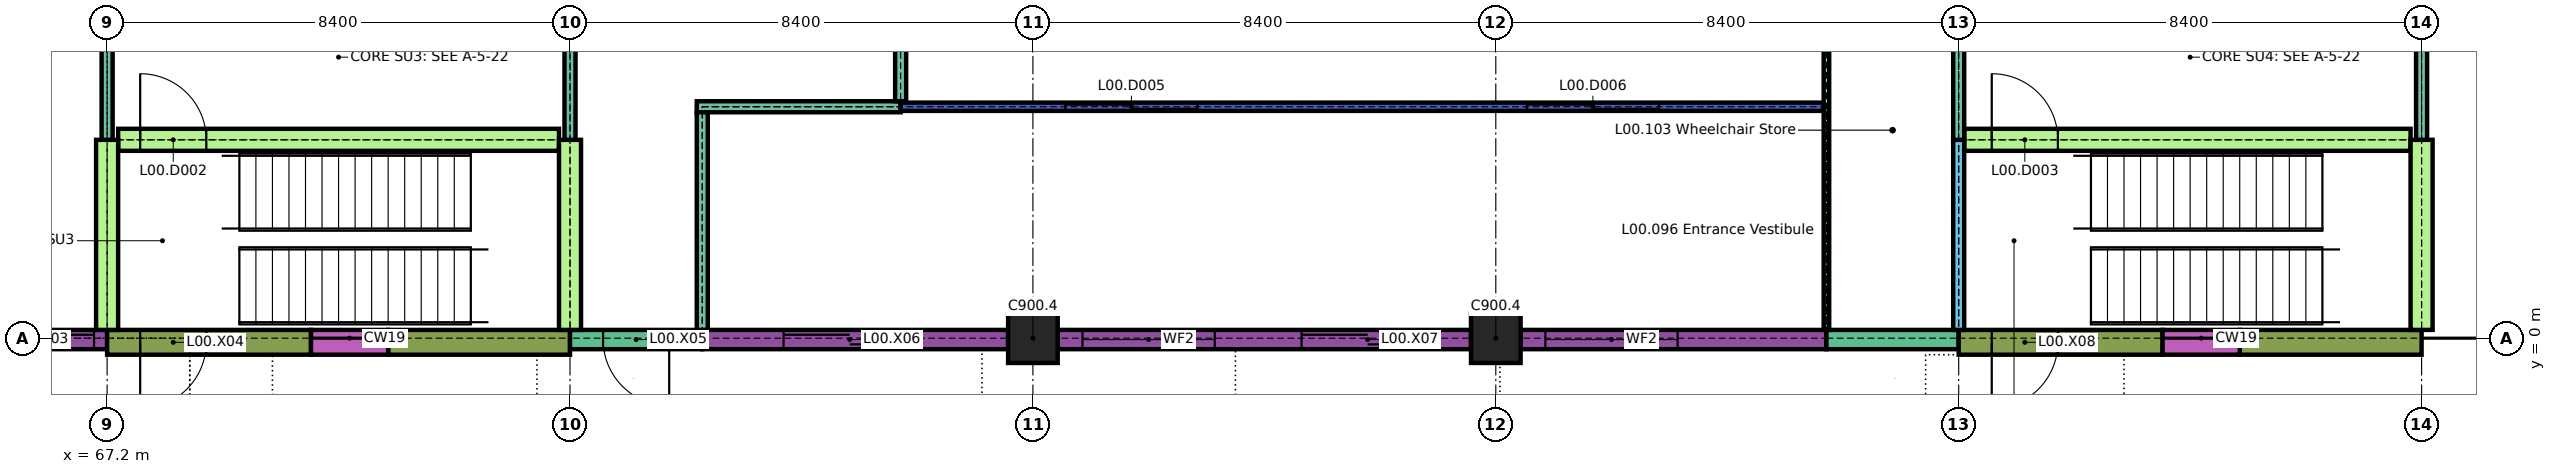
"""IFC4 building model, lengths in metres.
Left out: names, types, materials, properties, quantities, classifications, styles, units other than length and angle.
Written with IfcOpenShell. Run it as: python <this file> out.ifc"""

import sys

from ifc_helpers import new_model, si_unit, direction, frame, frame_2d, origin, origin_2d, place, context, subcontext, project, spatial, rectangle, extrude, element, fill, save


model = new_model("IFC4")
c1 = context("Model", 3, precision=1e-05, world=origin(), true_north=direction((0.0, 1.0)))
c2 = subcontext(c1, "Body", "Model", "MODEL_VIEW")
j1 = project(units=[si_unit("LENGTHUNIT", "METRE"), si_unit("PLANEANGLEUNIT", "RADIAN")], contexts=[c1])
p1 = place(None, origin())
s1 = spatial("IfcSite", under=j1, at=p1, CompositionType="ELEMENT")
p2 = place(p1, origin())
s2 = spatial("IfcBuilding", under=s1, at=p2, CompositionType="ELEMENT")
p3 = place(p2, origin())
s3 = spatial("IfcBuildingStorey", under=s2, at=p3, CompositionType="ELEMENT", Elevation=0.0)
for number, where, z_axis, x_axis in (
    (1, (84.0, 0.0, 0.0), (0.0, 0.0, 1.0), (1.0, 0.0, 0.0)),
    (2, (92.4, 0.0, 0.0), (0.0, 0.0, 1.0), (1.0, 0.0, 0.0)),
):
    element("IfcColumn", number, at=place(p3, frame(where, z_axis=z_axis, x_axis=x_axis)), inside=s3, PredefinedType="COLUMN", context=c2, shape_type="SweptSolid", body=[
        extrude(rectangle(XDim=0.9, YDim=0.9, at=origin_2d()), origin(), (0.0, 0.0, 1.0), 4.14),
    ])
p4 = place(p3, frame((59.25, -0.025, 0.0), z_axis=(0.0, 0.0, 1.0), x_axis=(1.0, 0.0, 0.0)))
e3 = element("IfcWall", 3, at=p4, inside=s3, PredefinedType="SOLIDWALL", context=c2, shape_type="SweptSolid", body=[
    extrude(rectangle(XDim=7.95, YDim=0.35, at=frame_2d((3.975, 0.0))), origin(), (0.0, 0.0, 1.0), 3.84),
])
p5 = place(p4, frame((4.212, 0.0, 0.0)))
e4 = element("IfcOpeningElement", 4, at=p5, cuts=e3, PredefinedType="OPENING", context=c2, shape_type="SweptSolid", body=[
    extrude(rectangle(XDim=3.5, YDim=3.0, at=frame_2d((1.75, 1.5))), frame((0.0, 0.185, 0.0), z_axis=(0.0, -1.0, 0.0), x_axis=(1.0, 0.0, 0.0)), (0.0, 0.0, 1.0), 0.37),
])
p6 = place(p3, frame((67.2, -0.075, 0.0), z_axis=(0.0, 0.0, 1.0), x_axis=(1.0, 0.0, 0.0)))
e5 = element("IfcWall", 5, at=p6, inside=s3, PredefinedType="SOLIDWALL", context=c2, shape_type="SweptSolid", body=[
    extrude(rectangle(XDim=3.7, YDim=0.45, at=frame_2d((1.85, 0.0))), origin(), (0.0, 0.0, 1.0), 4.14),
])
p7 = place(p6, frame((0.6, 0.0, 0.0)))
e6 = element("IfcOpeningElement", 6, at=p7, cuts=e5, PredefinedType="OPENING", context=c2, shape_type="SweptSolid", body=[
    extrude(rectangle(XDim=1.2, YDim=2.1, at=frame_2d((0.6, 1.05))), frame((0.0, 0.235, 0.0), z_axis=(0.0, -1.0, 0.0), x_axis=(1.0, 0.0, 0.0)), (0.0, 0.0, 1.0), 0.47),
])
p8 = place(p3, frame((72.3, -0.075, 0.0), z_axis=(0.0, 0.0, 1.0), x_axis=(1.0, 0.0, 0.0)))
e7 = element("IfcWall", 7, at=p8, inside=s3, PredefinedType="SOLIDWALL", context=c2, shape_type="SweptSolid", body=[
    extrude(rectangle(XDim=3.3, YDim=0.45, at=frame_2d((1.65, 0.0))), origin(), (0.0, 0.0, 1.0), 4.14),
])
p9 = place(p3, frame((70.9, -0.075, 0.0), z_axis=(0.0, 0.0, 1.0), x_axis=(1.0, 0.0, 0.0)))
e8 = element("IfcWall", 8, at=p9, inside=s3, PredefinedType="SOLIDWALL", context=c2, shape_type="SweptSolid", body=[
    extrude(rectangle(XDim=1.4, YDim=0.45, at=frame_2d((0.7, 0.0))), origin(), (0.0, 0.0, 1.0), 0.6),
])
p10 = place(p3, frame((75.6, -0.025, 0.0), z_axis=(0.0, 0.0, 1.0), x_axis=(1.0, 0.0, 0.0)))
e9 = element("IfcWall", 9, at=p10, inside=s3, PredefinedType="SOLIDWALL", context=c2, shape_type="SweptSolid", body=[
    extrude(rectangle(XDim=2.4, YDim=0.35, at=frame_2d((1.2, 0.0))), origin(), (0.0, 0.0, 1.0), 3.84),
])
p11 = place(p10, frame((0.6, 0.0, 0.0)))
e10 = element("IfcOpeningElement", 10, at=p11, cuts=e9, PredefinedType="OPENING", context=c2, shape_type="SweptSolid", body=[
    extrude(rectangle(XDim=1.2, YDim=2.1, at=frame_2d((0.6, 1.05))), frame((0.0, 0.185, 0.0), z_axis=(0.0, -1.0, 0.0), x_axis=(1.0, 0.0, 0.0)), (0.0, 0.0, 1.0), 0.37),
])
p12 = place(p3, frame((78.0, -0.025, 0.0), z_axis=(0.0, 0.0, 1.0), x_axis=(1.0, 0.0, 0.0)))
e11 = element("IfcWall", 11, at=p12, inside=s3, PredefinedType="SOLIDWALL", context=c2, shape_type="SweptSolid", body=[
    extrude(rectangle(XDim=5.55, YDim=0.35, at=frame_2d((2.775, 0.0))), origin(), (0.0, 0.0, 1.0), 3.84),
])
p13 = place(p12, frame((1.475, 0.0, 0.0)))
e12 = element("IfcOpeningElement", 12, at=p13, cuts=e11, PredefinedType="OPENING", context=c2, shape_type="SweptSolid", body=[
    extrude(rectangle(XDim=2.4, YDim=3.0, at=frame_2d((1.2, 1.5))), frame((0.0, 0.185, 0.0), z_axis=(0.0, -1.0, 0.0), x_axis=(1.0, 0.0, 0.0)), (0.0, 0.0, 1.0), 0.37),
])
p14 = place(p3, frame((84.45, -0.025, 0.0), z_axis=(0.0, 0.0, 1.0), x_axis=(1.0, 0.0, 0.0)))
e13 = element("IfcWall", 13, at=p14, inside=s3, PredefinedType="SOLIDWALL", context=c2, shape_type="SweptSolid", body=[
    extrude(rectangle(XDim=7.5, YDim=0.35, at=frame_2d((3.75, 0.0))), origin(), (0.0, 0.0, 1.0), 3.84),
])
p15 = place(p14, frame((0.45, 0.0, 0.9)))
e14 = element("IfcOpeningElement", 14, at=p15, cuts=e13, PredefinedType="OPENING", context=c2, shape_type="SweptSolid", body=[
    extrude(rectangle(XDim=2.4, YDim=2.1, at=frame_2d((1.2, 1.05))), frame((0.0, 0.185, 0.0), z_axis=(0.0, -1.0, 0.0), x_axis=(1.0, 0.0, 0.0)), (0.0, 0.0, 1.0), 0.37),
])
p16 = place(p14, frame((4.425, 0.0, 0.0)))
e15 = element("IfcOpeningElement", 15, at=p16, cuts=e13, PredefinedType="OPENING", context=c2, shape_type="SweptSolid", body=[
    extrude(rectangle(XDim=2.4, YDim=3.0, at=frame_2d((1.2, 1.5))), frame((0.0, 0.185, 0.0), z_axis=(0.0, -1.0, 0.0), x_axis=(1.0, 0.0, 0.0)), (0.0, 0.0, 1.0), 0.37),
])
p17 = place(p3, frame((92.85, -0.025, 0.0), z_axis=(0.0, 0.0, 1.0), x_axis=(1.0, 0.0, 0.0)))
e16 = element("IfcWall", 16, at=p17, inside=s3, PredefinedType="SOLIDWALL", context=c2, shape_type="SweptSolid", body=[
    extrude(rectangle(XDim=5.55, YDim=0.35, at=frame_2d((2.775, 0.0))), origin(), (0.0, 0.0, 1.0), 3.84),
])
p18 = place(p17, frame((0.45, 0.0, 0.9)))
e17 = element("IfcOpeningElement", 17, at=p18, cuts=e16, PredefinedType="OPENING", context=c2, shape_type="SweptSolid", body=[
    extrude(rectangle(XDim=2.4, YDim=2.1, at=frame_2d((1.2, 1.05))), frame((0.0, 0.185, 0.0), z_axis=(0.0, -1.0, 0.0), x_axis=(1.0, 0.0, 0.0)), (0.0, 0.0, 1.0), 0.37),
])
p19 = place(p3, frame((98.4, -0.025, 0.0), z_axis=(0.0, 0.0, 1.0), x_axis=(1.0, 0.0, 0.0)))
e18 = element("IfcWall", 18, at=p19, inside=s3, PredefinedType="SOLIDWALL", context=c2, shape_type="SweptSolid", body=[
    extrude(rectangle(XDim=2.4, YDim=0.35, at=frame_2d((1.2, 0.0))), origin(), (0.0, 0.0, 1.0), 3.84),
])
p20 = place(p3, frame((100.8, -0.075, 0.0), z_axis=(0.0, 0.0, 1.0), x_axis=(1.0, 0.0, 0.0)))
e19 = element("IfcWall", 19, at=p20, inside=s3, PredefinedType="SOLIDWALL", context=c2, shape_type="SweptSolid", body=[
    extrude(rectangle(XDim=3.7, YDim=0.45, at=frame_2d((1.85, 0.0))), origin(), (0.0, 0.0, 1.0), 4.14),
])
p21 = place(p20, frame((0.6, 0.0, 0.0)))
e20 = element("IfcOpeningElement", 20, at=p21, cuts=e19, PredefinedType="OPENING", context=c2, shape_type="SweptSolid", body=[
    extrude(rectangle(XDim=1.2, YDim=2.1, at=frame_2d((0.6, 1.05))), frame((0.0, 0.235, 0.0), z_axis=(0.0, -1.0, 0.0), x_axis=(1.0, 0.0, 0.0)), (0.0, 0.0, 1.0), 0.47),
])
p22 = place(p3, frame((105.9, -0.075, 0.0), z_axis=(0.0, 0.0, 1.0), x_axis=(1.0, 0.0, 0.0)))
e21 = element("IfcWall", 21, at=p22, inside=s3, PredefinedType="SOLIDWALL", context=c2, shape_type="SweptSolid", body=[
    extrude(rectangle(XDim=3.3, YDim=0.45, at=frame_2d((1.65, 0.0))), origin(), (0.0, 0.0, 1.0), 4.14),
])
p23 = place(p3, frame((104.5, -0.075, 0.0), z_axis=(0.0, 0.0, 1.0), x_axis=(1.0, 0.0, 0.0)))
e22 = element("IfcWall", 22, at=p23, inside=s3, PredefinedType="SOLIDWALL", context=c2, shape_type="SweptSolid", body=[
    extrude(rectangle(XDim=1.4, YDim=0.45, at=frame_2d((0.7, 0.0))), origin(), (0.0, 0.0, 1.0), 0.6),
])
p24 = place(p3, frame((67.4, 3.6, 0.0), z_axis=(0.0, 0.0, 1.0), x_axis=(1.0, 0.0, 0.0)))
e23 = element("IfcWall", 23, at=p24, inside=s3, PredefinedType="SHEAR", context=c2, shape_type="SweptSolid", body=[
    extrude(rectangle(XDim=8.0, YDim=0.4, at=frame_2d((4.0, 0.0))), origin(), (0.0, 0.0, 1.0), 4.14),
])
p25 = place(p24, frame((0.4, 0.0, 0.0)))
e24 = element("IfcOpeningElement", 24, at=p25, cuts=e23, PredefinedType="OPENING", context=c2, shape_type="SweptSolid", body=[
    extrude(rectangle(XDim=1.2, YDim=2.1, at=frame_2d((0.6, 1.05))), frame((0.0, 0.21, 0.0), z_axis=(0.0, -1.0, 0.0), x_axis=(1.0, 0.0, 0.0)), (0.0, 0.0, 1.0), 0.42),
])
p26 = place(p3, frame((100.9, 3.6, 0.0), z_axis=(0.0, 0.0, 1.0), x_axis=(1.0, 0.0, 0.0)))
e25 = element("IfcWall", 25, at=p26, inside=s3, PredefinedType="SHEAR", context=c2, shape_type="SweptSolid", body=[
    extrude(rectangle(XDim=8.1, YDim=0.4, at=frame_2d((4.05, 0.0))), origin(), (0.0, 0.0, 1.0), 4.14),
])
p27 = place(p26, frame((0.5, 0.0, 0.0)))
e26 = element("IfcOpeningElement", 26, at=p27, cuts=e25, PredefinedType="OPENING", context=c2, shape_type="SweptSolid", body=[
    extrude(rectangle(XDim=1.2, YDim=2.1, at=frame_2d((0.6, 1.05))), frame((0.0, 0.21, 0.0), z_axis=(0.0, -1.0, 0.0), x_axis=(1.0, 0.0, 0.0)), (0.0, 0.0, 1.0), 0.42),
])
p28 = place(p3, frame((77.9, 4.2, 0.0), z_axis=(0.0, 0.0, 1.0), x_axis=(1.0, 0.0, 0.0)))
e27 = element("IfcWall", 27, at=p28, inside=s3, PredefinedType="PARTITIONING", context=c2, shape_type="SweptSolid", body=[
    extrude(rectangle(XDim=3.7, YDim=0.2, at=frame_2d((1.85, 0.0))), origin(), (0.0, 0.0, 1.0), 4.14),
])
p29 = place(p3, frame((81.6, 4.2, 0.0), z_axis=(0.0, 0.0, 1.0), x_axis=(1.0, 0.0, 0.0)))
e28 = element("IfcWall", 28, at=p29, inside=s3, PredefinedType="PARTITIONING", context=c2, shape_type="SweptSolid", body=[
    extrude(rectangle(XDim=16.75, YDim=0.15, at=frame_2d((8.375, 0.0))), origin(), (0.0, 0.0, 1.0), 4.14),
])
p30 = place(p29, frame((2.988, 0.0, 0.0)))
e29 = element("IfcOpeningElement", 29, at=p30, cuts=e28, PredefinedType="OPENING", context=c2, shape_type="SweptSolid", body=[
    extrude(rectangle(XDim=2.4, YDim=2.4, at=frame_2d((1.2, 1.2))), frame((0.0, 0.085, 0.0), z_axis=(0.0, -1.0, 0.0), x_axis=(1.0, 0.0, 0.0)), (0.0, 0.0, 1.0), 0.17),
])
p31 = place(p29, frame((11.363, 0.0, 0.0)))
e30 = element("IfcOpeningElement", 30, at=p31, cuts=e28, PredefinedType="OPENING", context=c2, shape_type="SweptSolid", body=[
    extrude(rectangle(XDim=2.4, YDim=2.4, at=frame_2d((1.2, 1.2))), frame((0.0, 0.085, 0.0), z_axis=(0.0, -1.0, 0.0), x_axis=(1.0, 0.0, 0.0)), (0.0, 0.0, 1.0), 0.17),
])
p32 = place(p3, frame((67.2, 0.15, 0.0), z_axis=(0.0, 0.0, 1.0), x_axis=(0.0, 1.0, 0.0)))
e31 = element("IfcWall", 31, at=p32, inside=s3, PredefinedType="SHEAR", context=c2, shape_type="SweptSolid", body=[
    extrude(rectangle(XDim=3.45, YDim=0.4, at=frame_2d((1.725, 0.0))), origin(), (0.0, 0.0, 1.0), 4.14),
])
p33 = place(p3, frame((67.2, 3.6, 0.0), z_axis=(0.0, 0.0, 1.0), x_axis=(0.0, 1.0, 0.0)))
e32 = element("IfcWall", 32, at=p33, inside=s3, PredefinedType="PARTITIONING", context=c2, shape_type="SweptSolid", body=[
    extrude(rectangle(XDim=4.8, YDim=0.2, at=frame_2d((2.4, 0.0))), origin(), (0.0, 0.0, 1.0), 4.14),
])
p34 = place(p3, frame((75.6, 0.15, 0.0), z_axis=(0.0, 0.0, 1.0), x_axis=(0.0, 1.0, 0.0)))
e33 = element("IfcWall", 33, at=p34, inside=s3, PredefinedType="SHEAR", context=c2, shape_type="SweptSolid", body=[
    extrude(rectangle(XDim=3.45, YDim=0.4, at=frame_2d((1.725, 0.0))), origin(), (0.0, 0.0, 1.0), 4.14),
])
p35 = place(p3, frame((75.6, 3.6, 0.0), z_axis=(0.0, 0.0, 1.0), x_axis=(0.0, 1.0, 0.0)))
e34 = element("IfcWall", 34, at=p35, inside=s3, PredefinedType="PARTITIONING", context=c2, shape_type="SweptSolid", body=[
    extrude(rectangle(XDim=6.6, YDim=0.2, at=frame_2d((3.3, 0.0))), origin(), (0.0, 0.0, 1.0), 4.14),
])
p36 = place(p35, frame((1.8, 0.0, 0.0)))
e35 = element("IfcOpeningElement", 35, at=p36, cuts=e34, PredefinedType="OPENING", context=c2, shape_type="SweptSolid", body=[
    extrude(rectangle(XDim=1.2, YDim=2.1, at=frame_2d((0.6, 1.05))), frame((0.0, 0.11, 0.0), z_axis=(0.0, -1.0, 0.0), x_axis=(1.0, 0.0, 0.0)), (0.0, 0.0, 1.0), 0.22),
])
p37 = place(p3, frame((78.0, 0.15, 0.0), z_axis=(0.0, 0.0, 1.0), x_axis=(0.0, 1.0, 0.0)))
e36 = element("IfcWall", 36, at=p37, inside=s3, PredefinedType="PARTITIONING", context=c2, shape_type="SweptSolid", body=[
    extrude(rectangle(XDim=3.95, YDim=0.2, at=frame_2d((1.975, 0.0))), origin(), (0.0, 0.0, 1.0), 4.14),
])
p38 = place(p3, frame((81.6, 4.3, 0.0), z_axis=(0.0, 0.0, 1.0), x_axis=(0.0, 1.0, 0.0)))
e37 = element("IfcWall", 37, at=p38, inside=s3, PredefinedType="PARTITIONING", context=c2, shape_type="SweptSolid", body=[
    extrude(rectangle(XDim=5.9, YDim=0.2, at=frame_2d((2.95, 0.0))), origin(), (0.0, 0.0, 1.0), 4.14),
])
p39 = place(p38, frame((2.35, 0.0, 0.0)))
e38 = element("IfcOpeningElement", 38, at=p39, cuts=e37, PredefinedType="OPENING", context=c2, shape_type="SweptSolid", body=[
    extrude(rectangle(XDim=1.2, YDim=2.1, at=frame_2d((0.6, 1.05))), frame((0.0, 0.11, 0.0), z_axis=(0.0, -1.0, 0.0), x_axis=(1.0, 0.0, 0.0)), (0.0, 0.0, 1.0), 0.22),
])
p40 = place(p3, frame((98.4, 0.15, 0.0), z_axis=(0.0, 0.0, 1.0), x_axis=(0.0, 1.0, 0.0)))
e39 = element("IfcWall", 39, at=p40, inside=s3, PredefinedType="PARTITIONING", context=c2, shape_type="SweptSolid", body=[
    extrude(rectangle(XDim=8.2, YDim=0.1, at=frame_2d((4.1, 0.0))), origin(), (0.0, 0.0, 1.0), 4.14),
])
p41 = place(p3, frame((100.8, 0.15, 0.0), z_axis=(0.0, 0.0, 1.0), x_axis=(0.0, 1.0, 0.0)))
e40 = element("IfcWall", 40, at=p41, inside=s3, PredefinedType="PARTITIONING", context=c2, shape_type="SweptSolid", body=[
    extrude(rectangle(XDim=3.45, YDim=0.2, at=frame_2d((1.725, 0.0))), origin(), (0.0, 0.0, 1.0), 4.14),
])
p42 = place(p3, frame((100.8, 3.6, 0.0), z_axis=(0.0, 0.0, 1.0), x_axis=(0.0, 1.0, 0.0)))
e41 = element("IfcWall", 41, at=p42, inside=s3, PredefinedType="PARTITIONING", context=c2, shape_type="SweptSolid", body=[
    extrude(rectangle(XDim=4.7, YDim=0.2, at=frame_2d((2.35, 0.0))), origin(), (0.0, 0.0, 1.0), 4.14),
])
p43 = place(p3, frame((109.2, 0.15, 0.0), z_axis=(0.0, 0.0, 1.0), x_axis=(0.0, 1.0, 0.0)))
e42 = element("IfcWall", 42, at=p43, inside=s3, PredefinedType="SHEAR", context=c2, shape_type="SweptSolid", body=[
    extrude(rectangle(XDim=3.45, YDim=0.4, at=frame_2d((1.725, 0.0))), origin(), (0.0, 0.0, 1.0), 4.14),
])
p44 = place(p3, frame((109.2, 3.6, 0.0), z_axis=(0.0, 0.0, 1.0), x_axis=(0.0, 1.0, 0.0)))
e43 = element("IfcWall", 43, at=p44, inside=s3, PredefinedType="PARTITIONING", context=c2, shape_type="SweptSolid", body=[
    extrude(rectangle(XDim=4.7, YDim=0.2, at=frame_2d((2.35, 0.0))), origin(), (0.0, 0.0, 1.0), 4.14),
])
p45 = place(p44, frame((1.65, 0.0, 0.9)))
e44 = element("IfcOpeningElement", 44, at=p45, cuts=e43, PredefinedType="OPENING", context=c2, shape_type="SweptSolid", body=[
    extrude(rectangle(XDim=1.5, YDim=1.0, at=frame_2d((0.75, 0.5))), frame((0.0, 0.11, 0.0), z_axis=(0.0, -1.0, 0.0), x_axis=(1.0, 0.0, 0.0)), (0.0, 0.0, 1.0), 0.22),
])
p46 = place(p5, frame((3.5, 0.0, 0.0), x_axis=(-1.0, 0.0, 0.0)))
e45 = element("IfcDoor", 45, at=p46, inside=s3, OperationType="ROLLINGUP", PredefinedType="GATE", context=c2, shape_type="SweptSolid", body=[
    extrude(rectangle(XDim=3.5, YDim=3.0, at=frame_2d((1.75, 1.5))), frame((0.0, 0.025, 0.0), z_axis=(0.0, -1.0, 0.0), x_axis=(1.0, 0.0, 0.0)), (0.0, 0.0, 1.0), 0.05),
])
fill(e4, e45)
p47 = place(p7, frame((1.2, 0.0, 0.0), x_axis=(-1.0, 0.0, 0.0)))
e46 = element("IfcDoor", 46, at=p47, inside=s3, OperationType="SINGLE_SWING_LEFT", PredefinedType="DOOR", context=c2, shape_type="SweptSolid", body=[
    extrude(rectangle(XDim=1.2, YDim=2.1, at=frame_2d((0.6, 1.05))), frame((0.0, 0.025, 0.0), z_axis=(0.0, -1.0, 0.0), x_axis=(1.0, 0.0, 0.0)), (0.0, 0.0, 1.0), 0.05),
])
fill(e6, e46)
p48 = place(p11, frame((1.2, 0.0, 0.0), x_axis=(-1.0, 0.0, 0.0)))
e47 = element("IfcDoor", 47, at=p48, inside=s3, OperationType="SINGLE_SWING_RIGHT", PredefinedType="DOOR", context=c2, shape_type="SweptSolid", body=[
    extrude(rectangle(XDim=1.2, YDim=2.1, at=frame_2d((0.6, 1.05))), frame((0.0, 0.025, 0.0), z_axis=(0.0, -1.0, 0.0), x_axis=(1.0, 0.0, 0.0)), (0.0, 0.0, 1.0), 0.05),
])
fill(e10, e47)
p49 = place(p15, origin())
e48 = element("IfcWindow", 48, at=p49, inside=s3, PartitioningType="DOUBLE_PANEL_VERTICAL", PredefinedType="WINDOW", context=c2, shape_type="SweptSolid", body=[
    extrude(rectangle(XDim=2.4, YDim=2.1, at=frame_2d((1.2, 1.05))), frame((0.0, 0.03, 0.0), z_axis=(0.0, -1.0, 0.0), x_axis=(1.0, 0.0, 0.0)), (0.0, 0.0, 1.0), 0.06),
])
fill(e14, e48)
p50 = place(p18, origin())
e49 = element("IfcWindow", 49, at=p50, inside=s3, PartitioningType="DOUBLE_PANEL_VERTICAL", PredefinedType="WINDOW", context=c2, shape_type="SweptSolid", body=[
    extrude(rectangle(XDim=2.4, YDim=2.1, at=frame_2d((1.2, 1.05))), frame((0.0, 0.03, 0.0), z_axis=(0.0, -1.0, 0.0), x_axis=(1.0, 0.0, 0.0)), (0.0, 0.0, 1.0), 0.06),
])
fill(e17, e49)
p51 = place(p13, frame((2.4, 0.0, 0.0), x_axis=(-1.0, 0.0, 0.0)))
e50 = element("IfcDoor", 50, at=p51, inside=s3, OperationType="DOUBLE_DOOR_SLIDING", PredefinedType="DOOR", context=c2, shape_type="SweptSolid", body=[
    extrude(rectangle(XDim=2.4, YDim=3.0, at=frame_2d((1.2, 1.5))), frame((0.0, 0.06, 0.0), z_axis=(0.0, -1.0, 0.0), x_axis=(1.0, 0.0, 0.0)), (0.0, 0.0, 1.0), 0.12),
])
fill(e12, e50)
p52 = place(p16, frame((2.4, 0.0, 0.0), x_axis=(-1.0, 0.0, 0.0)))
e51 = element("IfcDoor", 51, at=p52, inside=s3, OperationType="DOUBLE_DOOR_SLIDING", PredefinedType="DOOR", context=c2, shape_type="SweptSolid", body=[
    extrude(rectangle(XDim=2.4, YDim=3.0, at=frame_2d((1.2, 1.5))), frame((0.0, 0.06, 0.0), z_axis=(0.0, -1.0, 0.0), x_axis=(1.0, 0.0, 0.0)), (0.0, 0.0, 1.0), 0.12),
])
fill(e15, e51)
p53 = place(p21, frame((1.2, 0.0, 0.0), x_axis=(-1.0, 0.0, 0.0)))
e52 = element("IfcDoor", 52, at=p53, inside=s3, OperationType="SINGLE_SWING_LEFT", PredefinedType="DOOR", context=c2, shape_type="SweptSolid", body=[
    extrude(rectangle(XDim=1.2, YDim=2.1, at=frame_2d((0.6, 1.05))), frame((0.0, 0.025, 0.0), z_axis=(0.0, -1.0, 0.0), x_axis=(1.0, 0.0, 0.0)), (0.0, 0.0, 1.0), 0.05),
])
fill(e20, e52)
p54 = place(p25, origin())
e53 = element("IfcDoor", 53, at=p54, inside=s3, OperationType="SINGLE_SWING_RIGHT", PredefinedType="DOOR", context=c2, shape_type="SweptSolid", body=[
    extrude(rectangle(XDim=1.2, YDim=2.1, at=frame_2d((0.6, 1.05))), frame((0.0, 0.025, 0.0), z_axis=(0.0, -1.0, 0.0), x_axis=(1.0, 0.0, 0.0)), (0.0, 0.0, 1.0), 0.05),
])
fill(e24, e53)
p55 = place(p27, origin())
e54 = element("IfcDoor", 54, at=p55, inside=s3, OperationType="SINGLE_SWING_RIGHT", PredefinedType="DOOR", context=c2, shape_type="SweptSolid", body=[
    extrude(rectangle(XDim=1.2, YDim=2.1, at=frame_2d((0.6, 1.05))), frame((0.0, 0.025, 0.0), z_axis=(0.0, -1.0, 0.0), x_axis=(1.0, 0.0, 0.0)), (0.0, 0.0, 1.0), 0.05),
])
fill(e26, e54)
p56 = place(p30, origin())
e55 = element("IfcDoor", 55, at=p56, inside=s3, OperationType="DOUBLE_DOOR_SLIDING", PredefinedType="DOOR", context=c2, shape_type="SweptSolid", body=[
    extrude(rectangle(XDim=2.4, YDim=2.4, at=frame_2d((1.2, 1.2))), frame((0.0, 0.025, 0.0), z_axis=(0.0, -1.0, 0.0), x_axis=(1.0, 0.0, 0.0)), (0.0, 0.0, 1.0), 0.05),
])
fill(e29, e55)
p57 = place(p31, origin())
e56 = element("IfcDoor", 56, at=p57, inside=s3, OperationType="DOUBLE_DOOR_SLIDING", PredefinedType="DOOR", context=c2, shape_type="SweptSolid", body=[
    extrude(rectangle(XDim=2.4, YDim=2.4, at=frame_2d((1.2, 1.2))), frame((0.0, 0.025, 0.0), z_axis=(0.0, -1.0, 0.0), x_axis=(1.0, 0.0, 0.0)), (0.0, 0.0, 1.0), 0.05),
])
fill(e30, e56)
save(model, sys.argv[1])
